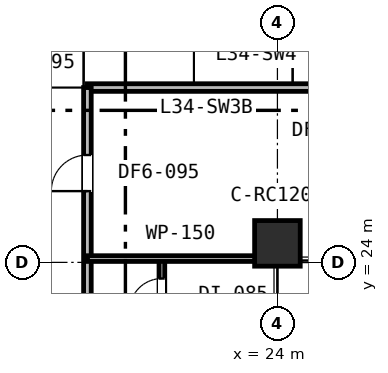
"""IFC4 building model, lengths in metres.
Left out: names, types, materials, properties, quantities, classifications, styles, units other than length and angle.
Written with IfcOpenShell. Run it as: python <this file> out.ifc"""

import sys

from ifc_helpers import new_model, si_unit, direction, frame, frame_2d, origin, origin_2d, place, context, subcontext, project, spatial, rectangle, extrude, element, fill, save


model = new_model("IFC4")
c1 = context("Model", 3, precision=1e-05, world=origin(), true_north=direction((0.0, 1.0)))
c2 = subcontext(c1, "Body", "Model", "MODEL_VIEW")
j1 = project(units=[si_unit("LENGTHUNIT", "METRE"), si_unit("PLANEANGLEUNIT", "RADIAN")], contexts=[c1])
p1 = place(None, origin())
s1 = spatial("IfcSite", under=j1, at=p1, CompositionType="ELEMENT")
p2 = place(p1, origin())
s2 = spatial("IfcBuilding", under=s1, at=p2, CompositionType="ELEMENT")
p3 = place(p2, frame((0.0, 0.0, 133.2)))
s3 = spatial("IfcBuildingStorey", under=s2, at=p3, CompositionType="ELEMENT", Elevation=133.2)
p4 = place(p3, frame((24.0, 24.5, 0.0), z_axis=(0.0, 0.0, 1.0), x_axis=(1.0, 0.0, 0.0)))
e1 = element("IfcColumn", 1, at=p4, inside=s3, PredefinedType="COLUMN", context=c2, shape_type="SweptSolid", body=[
    extrude(rectangle(XDim=1.2, YDim=1.2, at=origin_2d()), origin(), (0.0, 0.0, 1.0), 3.6),
])
p5 = place(p3, frame((19.0, 28.6, 0.0), z_axis=(0.0, 0.0, 1.0), x_axis=(1.0, 0.0, 0.0)))
e2 = element("IfcWall", 2, at=p5, inside=s3, PredefinedType="PARTITIONING", context=c2, shape_type="SweptSolid", body=[
    extrude(rectangle(XDim=25.2, YDim=0.2, at=frame_2d((12.6, 0.0))), origin(), (0.0, 0.0, 1.0), 2.93),
])
p6 = place(p5, frame((6.561, 0.0, 0.0)))
e3 = element("IfcOpeningElement", 3, at=p6, cuts=e2, PredefinedType="OPENING", context=c2, shape_type="SweptSolid", body=[
    extrude(rectangle(XDim=0.95, YDim=2.15, at=frame_2d((0.475, 1.075))), frame((0.0, 0.11, 0.0), z_axis=(0.0, -1.0, 0.0), x_axis=(1.0, 0.0, 0.0)), (0.0, 0.0, 1.0), 0.22),
])
p7 = place(p5, frame((13.332, 0.0, 0.0)))
e4 = element("IfcOpeningElement", 4, at=p7, cuts=e2, PredefinedType="OPENING", context=c2, shape_type="SweptSolid", body=[
    extrude(rectangle(XDim=0.95, YDim=2.15, at=frame_2d((0.475, 1.075))), frame((0.0, 0.11, 0.0), z_axis=(0.0, -1.0, 0.0), x_axis=(1.0, 0.0, 0.0)), (0.0, 0.0, 1.0), 0.22),
])
p8 = place(p5, frame((20.032, 0.0, 0.0)))
e5 = element("IfcOpeningElement", 5, at=p8, cuts=e2, PredefinedType="OPENING", context=c2, shape_type="SweptSolid", body=[
    extrude(rectangle(XDim=0.95, YDim=2.15, at=frame_2d((0.475, 1.075))), frame((0.0, 0.11, 0.0), z_axis=(0.0, -1.0, 0.0), x_axis=(1.0, 0.0, 0.0)), (0.0, 0.0, 1.0), 0.22),
])
p9 = place(p3, frame((19.0, 10.6, 0.0), z_axis=(0.0, 0.0, 1.0), x_axis=(0.0, 1.0, 0.0)))
e6 = element("IfcWall", 6, at=p9, inside=s3, PredefinedType="PARTITIONING", context=c2, shape_type="SweptSolid", body=[
    extrude(rectangle(XDim=18.0, YDim=0.2, at=frame_2d((9.0, 0.0))), origin(), (0.0, 0.0, 1.0), 2.93),
])
p10 = place(p9, frame((0.772, 0.0, 0.0)))
e7 = element("IfcOpeningElement", 7, at=p10, cuts=e6, PredefinedType="OPENING", context=c2, shape_type="SweptSolid", body=[
    extrude(rectangle(XDim=0.95, YDim=2.15, at=frame_2d((0.475, 1.075))), frame((0.0, 0.11, 0.0), z_axis=(0.0, -1.0, 0.0), x_axis=(1.0, 0.0, 0.0)), (0.0, 0.0, 1.0), 0.22),
])
p11 = place(p9, frame((5.272, 0.0, 0.0)))
e8 = element("IfcOpeningElement", 8, at=p11, cuts=e6, PredefinedType="OPENING", context=c2, shape_type="SweptSolid", body=[
    extrude(rectangle(XDim=0.95, YDim=2.15, at=frame_2d((0.475, 1.075))), frame((0.0, 0.11, 0.0), z_axis=(0.0, -1.0, 0.0), x_axis=(1.0, 0.0, 0.0)), (0.0, 0.0, 1.0), 0.22),
])
p12 = place(p9, frame((9.773, 0.0, 0.0)))
e9 = element("IfcOpeningElement", 9, at=p12, cuts=e6, PredefinedType="OPENING", context=c2, shape_type="SweptSolid", body=[
    extrude(rectangle(XDim=0.95, YDim=2.15, at=frame_2d((0.475, 1.075))), frame((0.0, 0.11, 0.0), z_axis=(0.0, -1.0, 0.0), x_axis=(1.0, 0.0, 0.0)), (0.0, 0.0, 1.0), 0.22),
])
p13 = place(p9, frame((15.275, 0.0, 0.0)))
e10 = element("IfcOpeningElement", 10, at=p13, cuts=e6, PredefinedType="OPENING", context=c2, shape_type="SweptSolid", body=[
    extrude(rectangle(XDim=0.95, YDim=2.15, at=frame_2d((0.475, 1.075))), frame((0.0, 0.11, 0.0), z_axis=(0.0, -1.0, 0.0), x_axis=(1.0, 0.0, 0.0)), (0.0, 0.0, 1.0), 0.22),
])
p14 = place(p3, frame((20.96, 22.2, 0.0), z_axis=(0.0, 0.0, 1.0), x_axis=(0.0, 1.0, 0.0)))
e11 = element("IfcWall", 11, at=p14, inside=s3, PredefinedType="PARTITIONING", context=c2, shape_type="SweptSolid", body=[
    extrude(rectangle(XDim=1.9, YDim=0.15, at=frame_2d((0.95, 0.0))), origin(), (0.0, 0.0, 1.0), 2.93),
])
p15 = place(p14, frame((0.525, 0.0, 0.0)))
e12 = element("IfcOpeningElement", 12, at=p15, cuts=e11, PredefinedType="OPENING", context=c2, shape_type="SweptSolid", body=[
    extrude(rectangle(XDim=0.85, YDim=2.15, at=frame_2d((0.425, 1.075))), frame((0.0, 0.085, 0.0), z_axis=(0.0, -1.0, 0.0), x_axis=(1.0, 0.0, 0.0)), (0.0, 0.0, 1.0), 0.17),
])
p16 = place(p3, frame((19.0, 24.1, 0.0), z_axis=(0.0, 0.0, 1.0), x_axis=(1.0, 0.0, 0.0)))
e13 = element("IfcWall", 13, at=p16, inside=s3, PredefinedType="PARTITIONING", context=c2, shape_type="SweptSolid", body=[
    extrude(rectangle(XDim=4.9, YDim=0.15, at=frame_2d((2.45, 0.0))), origin(), (0.0, 0.0, 1.0), 2.93),
])
p17 = place(p15, origin())
e14 = element("IfcDoor", 14, at=p17, inside=s3, OperationType="SINGLE_SWING_LEFT", PredefinedType="DOOR", context=c2, shape_type="SweptSolid", body=[
    extrude(rectangle(XDim=0.85, YDim=2.15, at=frame_2d((0.425, 1.075))), frame((0.0, 0.025, 0.0), z_axis=(0.0, -1.0, 0.0), x_axis=(1.0, 0.0, 0.0)), (0.0, 0.0, 1.0), 0.05),
])
fill(e12, e14)
p18 = place(p13, origin())
e15 = element("IfcDoor", 15, at=p18, inside=s3, OperationType="SINGLE_SWING_LEFT", PredefinedType="DOOR", context=c2, shape_type="SweptSolid", body=[
    extrude(rectangle(XDim=0.95, YDim=2.15, at=frame_2d((0.475, 1.075))), frame((0.0, 0.025, 0.0), z_axis=(0.0, -1.0, 0.0), x_axis=(1.0, 0.0, 0.0)), (0.0, 0.0, 1.0), 0.05),
])
fill(e10, e15)
save(model, sys.argv[1])
